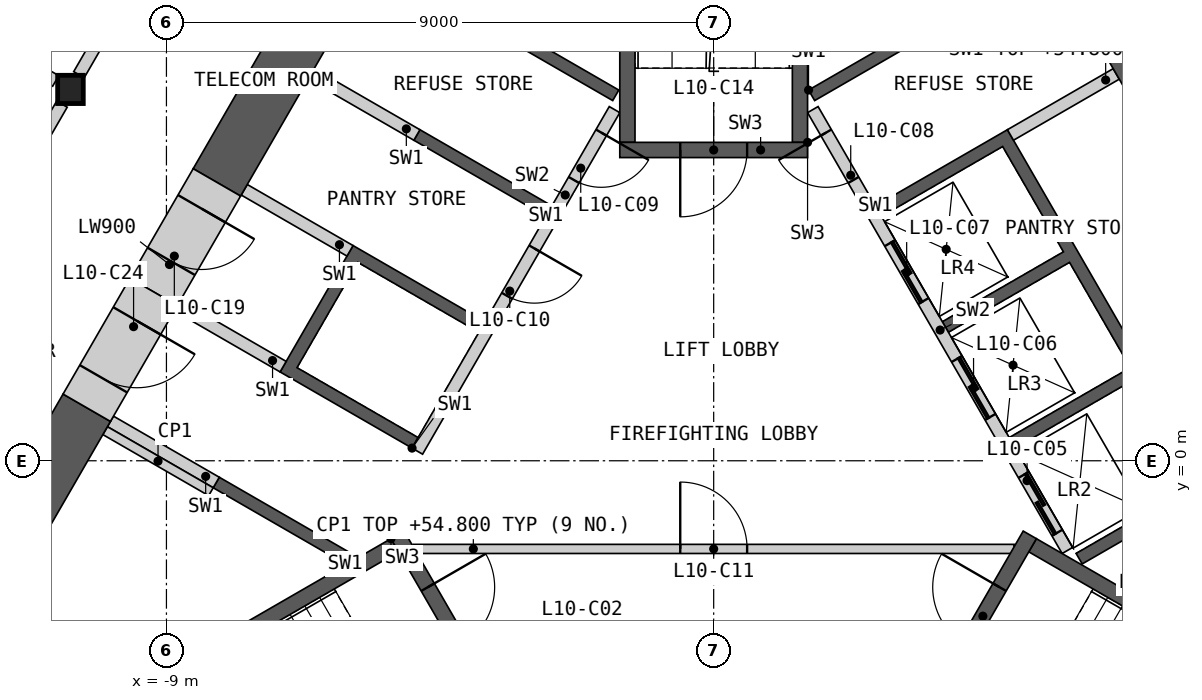
"""IFC4 building model, lengths in metres.
Left out: names, types, materials, properties, quantities, classifications, styles, units other than length and angle.
Written with IfcOpenShell. Run it as: python <this file> out.ifc"""

import sys

from ifc_helpers import new_model, si_unit, direction, frame, frame_2d, origin, origin_2d, place, context, subcontext, project, spatial, polyline, rectangle, i_section, outline, extrude, element, fill, save


model = new_model("IFC4")
c1 = context("Model", 3, precision=1e-05, world=origin(), true_north=direction((0.0, 1.0)))
c2 = subcontext(c1, "Body", "Model", "MODEL_VIEW")
j1 = project(units=[si_unit("LENGTHUNIT", "METRE"), si_unit("PLANEANGLEUNIT", "RADIAN")], contexts=[c1])
p1 = place(None, origin())
s1 = spatial("IfcSite", under=j1, at=p1, CompositionType="ELEMENT")
p2 = place(p1, origin())
s2 = spatial("IfcBuilding", under=s1, at=p2, CompositionType="ELEMENT")
p3 = place(p2, frame((0.0, 0.0, 51.0)))
s3 = spatial("IfcBuildingStorey", under=s2, at=p3, CompositionType="ELEMENT", Elevation=51.0)
p4 = place(p3, frame((-10.578, 6.107, 0.0), z_axis=(0.0, 0.0, 1.0), x_axis=(1.0, 0.0, 0.0)))
e1 = element("IfcColumn", 1, at=p4, inside=s3, PredefinedType="COLUMN", context=c2, shape_type="SweptSolid", body=[
    extrude(i_section(OverallWidth=0.421, OverallDepth=0.465, WebThickness=0.045, FlangeThickness=0.072, at=origin_2d()), origin(), (0.0, 0.0, 1.0), 4.2),
])
p5 = place(p3, origin())
e2 = element("IfcWall", 2, at=p5, inside=s3, PredefinedType="SHEAR", context=c2, shape_type="SweptSolid", body=[
    extrude(outline(polyline([(1.561, 6.097), (3.731, 7.35), (3.831, 7.177), (1.66, 5.924), (1.561, 6.097)])), origin(), (0.0, 0.0, 1.0), 3.8),
])
p6 = place(p3, origin())
e3 = element("IfcWall", 3, at=p6, inside=s3, PredefinedType="SHEAR", context=c2, shape_type="SweptSolid", body=[
    extrude(outline(polyline([(2.66, 4.192), (4.831, 5.445), (8.231, -0.444), (6.061, -1.697), (5.96, -1.524), (7.952, -0.374), (6.952, 1.358), (4.96, 0.208), (4.861, 0.381), (6.852, 1.531), (5.852, 3.263), (3.861, 2.113), (3.76, 2.287), (5.752, 3.437), (4.752, 5.169), (2.76, 4.019), (2.66, 4.192)])), origin(), (0.0, 0.0, 1.0), 3.8),
])
p7 = place(p3, frame((5.817, -1.476, 0.0), z_axis=(0.0, 0.0, 1.0), x_axis=(-0.500002616675, 0.866023893041, 0.0)))
e4 = element("IfcWall", 4, at=p7, inside=s3, PredefinedType="SOLIDWALL", context=c2, shape_type="SweptSolid", body=[
    extrude(rectangle(XDim=8.373, YDim=0.2, at=frame_2d((4.187, 0.0))), origin(), (0.0, 0.0, 1.0), 3.8),
])
p8 = place(p7, frame((0.337, 0.0, 0.0)))
e5 = element("IfcOpeningElement", 5, at=p8, cuts=e4, PredefinedType="OPENING", context=c2, shape_type="SweptSolid", body=[
    extrude(rectangle(XDim=1.1, YDim=2.1, at=frame_2d((0.55, 1.05))), frame((0.0, 0.11, 0.0), z_axis=(0.0, -1.0, 0.0), x_axis=(1.0, 0.0, 0.0)), (0.0, 0.0, 1.0), 0.22),
])
p9 = place(p7, frame((2.537, 0.0, 0.0)))
e6 = element("IfcOpeningElement", 6, at=p9, cuts=e4, PredefinedType="OPENING", context=c2, shape_type="SweptSolid", body=[
    extrude(rectangle(XDim=1.1, YDim=2.1, at=frame_2d((0.55, 1.05))), frame((0.0, 0.11, 0.0), z_axis=(0.0, -1.0, 0.0), x_axis=(1.0, 0.0, 0.0)), (0.0, 0.0, 1.0), 0.22),
])
p10 = place(p7, frame((4.737, 0.0, 0.0)))
e7 = element("IfcOpeningElement", 7, at=p10, cuts=e4, PredefinedType="OPENING", context=c2, shape_type="SweptSolid", body=[
    extrude(rectangle(XDim=1.1, YDim=2.1, at=frame_2d((0.55, 1.05))), frame((0.0, 0.11, 0.0), z_axis=(0.0, -1.0, 0.0), x_axis=(1.0, 0.0, 0.0)), (0.0, 0.0, 1.0), 0.22),
])
p11 = place(p7, frame((7.037, 0.0, 0.0)))
e8 = element("IfcOpeningElement", 8, at=p11, cuts=e4, PredefinedType="OPENING", context=c2, shape_type="SweptSolid", body=[
    extrude(rectangle(XDim=0.9, YDim=2.1, at=frame_2d((0.45, 1.05))), frame((0.0, 0.11, 0.0), z_axis=(0.0, -1.0, 0.0), x_axis=(1.0, 0.0, 0.0)), (0.0, 0.0, 1.0), 0.22),
])
p12 = place(p3, frame((4.881, 5.358, 0.0), z_axis=(0.0, 0.0, 1.0), x_axis=(0.866035824272, 0.499981950752, 0.0)))
e9 = element("IfcWall", 9, at=p12, inside=s3, PredefinedType="SHEAR", context=c2, shape_type="SweptSolid", body=[
    extrude(rectangle(XDim=2.009, YDim=0.2, at=frame_2d((1.004, 0.0))), origin(), (0.0, 0.0, 1.0), 3.8),
])
p13 = place(p3, origin())
e10 = element("IfcWall", 10, at=p13, inside=s3, PredefinedType="SHEAR", context=c2, shape_type="SweptSolid", body=[
    extrude(outline(polyline([(-6.061, -1.697), (-8.231, -0.444), (-8.131, -0.271), (-5.96, -1.524), (-6.061, -1.697)])), origin(), (0.0, 0.0, 1.0), 3.8),
])
p14 = place(p3, origin())
e11 = element("IfcWall", 11, at=p14, inside=s3, PredefinedType="SHEAR", context=c2, shape_type="SweptSolid", body=[
    extrude(outline(polyline([(-4.96, 0.208), (-7.131, 1.461), (-5.931, 3.54), (-3.76, 2.287), (-3.861, 2.113), (-5.852, 3.263), (-6.852, 1.531), (-4.861, 0.381), (-4.96, 0.208)])), origin(), (0.0, 0.0, 1.0), 3.8),
])
p15 = place(p3, origin())
e12 = element("IfcWall", 12, at=p15, inside=s3, PredefinedType="SHEAR", context=c2, shape_type="SweptSolid", body=[
    extrude(outline(polyline([(-2.76, 4.019), (-4.931, 5.272), (-4.831, 5.445), (-2.66, 4.192), (-2.76, 4.019)])), origin(), (0.0, 0.0, 1.0), 3.8),
])
p16 = place(p3, origin())
e13 = element("IfcWall", 13, at=p16, inside=s3, PredefinedType="SHEAR", context=c2, shape_type="SweptSolid", body=[
    extrude(outline(polyline([(-3.731, 7.35), (-1.561, 6.097), (-1.66, 5.924), (-3.831, 7.177), (-3.731, 7.35)])), origin(), (0.0, 0.0, 1.0), 3.8),
])
p17 = place(p3, frame((-1.631, 5.776, 0.0), z_axis=(0.0, 0.0, 1.0), x_axis=(-0.499992876559, -0.866029516466, 0.0)))
e14 = element("IfcWall", 14, at=p17, inside=s3, PredefinedType="SOLIDWALL", context=c2, shape_type="SweptSolid", body=[
    extrude(rectangle(XDim=6.486, YDim=0.2, at=frame_2d((3.243, 0.0))), origin(), (0.0, 0.0, 1.0), 3.8),
])
p18 = place(p17, frame((0.437, 0.0, 0.0)))
e15 = element("IfcOpeningElement", 15, at=p18, cuts=e14, PredefinedType="OPENING", context=c2, shape_type="SweptSolid", body=[
    extrude(rectangle(XDim=0.9, YDim=2.1, at=frame_2d((0.45, 1.05))), frame((0.0, 0.11, 0.0), z_axis=(0.0, -1.0, 0.0), x_axis=(1.0, 0.0, 0.0)), (0.0, 0.0, 1.0), 0.22),
])
p19 = place(p17, frame((2.637, 0.0, 0.0)))
e16 = element("IfcOpeningElement", 16, at=p19, cuts=e14, PredefinedType="OPENING", context=c2, shape_type="SweptSolid", body=[
    extrude(rectangle(XDim=0.9, YDim=2.1, at=frame_2d((0.45, 1.05))), frame((0.0, 0.11, 0.0), z_axis=(0.0, -1.0, 0.0), x_axis=(1.0, 0.0, 0.0)), (0.0, 0.0, 1.0), 0.22),
])
p20 = place(p3, frame((-4.881, 5.358, 0.0), z_axis=(0.0, 0.0, 1.0), x_axis=(-0.866035824272, 0.499981950752, 0.0)))
e17 = element("IfcWall", 17, at=p20, inside=s3, PredefinedType="SHEAR", context=c2, shape_type="SweptSolid", body=[
    extrude(rectangle(XDim=2.009, YDim=0.2, at=frame_2d((1.004, 0.0))), origin(), (0.0, 0.0, 1.0), 3.8),
])
p21 = place(p3, frame((-5.981, 3.453, 0.0), z_axis=(0.0, 0.0, 1.0), x_axis=(-0.866013584312, 0.500020471368, 0.0)))
e18 = element("IfcWall", 18, at=p21, inside=s3, PredefinedType="SHEAR", context=c2, shape_type="SweptSolid", body=[
    extrude(rectangle(XDim=2.009, YDim=0.2, at=frame_2d((1.005, 0.0))), origin(), (0.0, 0.0, 1.0), 3.8),
])
p22 = place(p3, frame((-7.081, 1.548, 0.0), z_axis=(0.0, 0.0, 1.0), x_axis=(-0.865983199114, 0.50007309351, 0.0)))
e19 = element("IfcWall", 19, at=p22, inside=s3, PredefinedType="SHEAR", context=c2, shape_type="SweptSolid", body=[
    extrude(rectangle(XDim=2.009, YDim=0.2, at=frame_2d((1.004, 0.0))), origin(), (0.0, 0.0, 1.0), 3.8),
])
p23 = place(p3, frame((-8.181, -0.357, 0.0), z_axis=(0.0, 0.0, 1.0), x_axis=(-0.866035824272, 0.499981950752, 0.0)))
e20 = element("IfcWall", 20, at=p23, inside=s3, PredefinedType="SHEAR", context=c2, shape_type="SweptSolid", body=[
    extrude(rectangle(XDim=2.009, YDim=0.2, at=frame_2d((1.004, 0.0))), origin(), (0.0, 0.0, 1.0), 3.8),
])
p24 = place(p3, frame((-4.941, -1.45, 0.0), z_axis=(0.0, 0.0, 1.0), x_axis=(1.0, 0.0, 0.0)))
e21 = element("IfcWall", 21, at=p24, inside=s3, PredefinedType="PARTITIONING", context=c2, shape_type="SweptSolid", body=[
    extrude(rectangle(XDim=9.882, YDim=0.15, at=frame_2d((4.941, 0.0))), origin(), (0.0, 0.0, 1.0), 3.8),
])
p25 = place(p24, frame((4.391, 0.0, 0.0)))
e22 = element("IfcOpeningElement", 22, at=p25, cuts=e21, PredefinedType="OPENING", context=c2, shape_type="SweptSolid", body=[
    extrude(rectangle(XDim=1.1, YDim=2.1, at=frame_2d((0.55, 1.05))), frame((0.0, 0.085, 0.0), z_axis=(0.0, -1.0, 0.0), x_axis=(1.0, 0.0, 0.0)), (0.0, 0.0, 1.0), 0.17),
])
p26 = place(p3, origin())
e23 = element("IfcWall", 23, at=p26, inside=s3, PredefinedType="SHEAR", context=c2, shape_type="SweptSolid", body=[
    extrude(outline(polyline([(-5.307, -1.281), (-10.374, -4.206), (-10.032, -4.298), (-5.182, -1.498), (-5.307, -1.281)])), origin(), (0.0, 0.0, 1.0), 3.8),
])
p27 = place(p3, frame((-5.199, -1.219, 0.0), z_axis=(0.0, 0.0, 1.0), x_axis=(0.499982516597, -0.866035497597, 0.0)))
e24 = element("IfcWall", 24, at=p27, inside=s3, PredefinedType="SHEAR", context=c2, shape_type="SweptSolid", body=[
    extrude(rectangle(XDim=3.088, YDim=0.25, at=frame_2d((1.544, 0.0))), origin(), (0.0, 0.0, 1.0), 3.8),
])
p28 = place(p27, frame((0.994, 0.0, 0.0)))
e25 = element("IfcOpeningElement", 25, at=p28, cuts=e24, PredefinedType="OPENING", context=c2, shape_type="SweptSolid", body=[
    extrude(rectangle(XDim=1.1, YDim=2.1, at=frame_2d((0.55, 1.05))), frame((0.0, 0.135, 0.0), z_axis=(0.0, -1.0, 0.0), x_axis=(1.0, 0.0, 0.0)), (0.0, 0.0, 1.0), 0.27),
])
p29 = place(p3, origin())
e26 = element("IfcWall", 26, at=p29, inside=s3, PredefinedType="SHEAR", context=c2, shape_type="SweptSolid", body=[
    extrude(outline(polyline([(10.032, -4.298), (10.374, -4.206), (5.307, -1.281), (5.182, -1.498), (10.032, -4.298)])), origin(), (0.0, 0.0, 1.0), 3.8),
])
p30 = place(p3, frame((3.655, -3.893, 0.0), z_axis=(0.0, 0.0, 1.0), x_axis=(0.499982516597, 0.866035497597, 0.0)))
e27 = element("IfcWall", 27, at=p30, inside=s3, PredefinedType="SHEAR", context=c2, shape_type="SweptSolid", body=[
    extrude(rectangle(XDim=3.088, YDim=0.25, at=frame_2d((1.544, 0.0))), origin(), (0.0, 0.0, 1.0), 3.8),
])
p31 = place(p30, frame((0.994, 0.0, 0.0)))
e28 = element("IfcOpeningElement", 28, at=p31, cuts=e27, PredefinedType="OPENING", context=c2, shape_type="SweptSolid", body=[
    extrude(rectangle(XDim=1.1, YDim=2.1, at=frame_2d((0.55, 1.05))), frame((0.0, 0.135, 0.0), z_axis=(0.0, -1.0, 0.0), x_axis=(1.0, 0.0, 0.0)), (0.0, 0.0, 1.0), 0.27),
])
p32 = place(p3, origin())
e29 = element("IfcWall", 29, at=p32, inside=s3, PredefinedType="SHEAR", context=c2, shape_type="SweptSolid", body=[
    extrude(outline(polyline([(1.544, 5.237), (1.544, 11.087), (1.294, 10.837), (1.294, 5.237), (1.544, 5.237)])), origin(), (0.0, 0.0, 1.0), 3.8),
])
p33 = place(p3, origin())
e30 = element("IfcWall", 30, at=p33, inside=s3, PredefinedType="SHEAR", context=c2, shape_type="SweptSolid", body=[
    extrude(outline(polyline([(-1.294, 10.837), (-1.544, 11.087), (-1.544, 5.237), (-1.294, 5.237), (-1.294, 10.837)])), origin(), (0.0, 0.0, 1.0), 3.8),
])
p34 = place(p3, frame((1.544, 5.112, 0.0), z_axis=(0.0, 0.0, 1.0), x_axis=(-1.0, 0.0, 0.0)))
e31 = element("IfcWall", 31, at=p34, inside=s3, PredefinedType="SHEAR", context=c2, shape_type="SweptSolid", body=[
    extrude(rectangle(XDim=3.088, YDim=0.25, at=frame_2d((1.544, 0.0))), origin(), (0.0, 0.0, 1.0), 3.8),
])
p35 = place(p34, frame((0.994, 0.0, 0.0)))
e32 = element("IfcOpeningElement", 32, at=p35, cuts=e31, PredefinedType="OPENING", context=c2, shape_type="SweptSolid", body=[
    extrude(rectangle(XDim=1.1, YDim=2.1, at=frame_2d((0.55, 1.05))), frame((0.0, 0.135, 0.0), z_axis=(0.0, -1.0, 0.0), x_axis=(1.0, 0.0, 0.0)), (0.0, 0.0, 1.0), 0.27),
])
p36 = place(p3, frame((-8.268, -0.509, 0.0), z_axis=(0.0, 0.0, 1.0), x_axis=(-0.866035824272, 0.499981950752, 0.0)))
e33 = element("IfcWall", 33, at=p36, inside=s3, PredefinedType="PARTITIONING", context=c2, shape_type="SweptSolid", body=[
    extrude(rectangle(XDim=2.009, YDim=0.15, at=frame_2d((1.004, 0.0))), origin(), (0.0, 0.0, 1.0), 3.8),
])
p37 = place(p3, frame((7.646, 5.486, 0.0), z_axis=(0.0, 0.0, 1.0), x_axis=(-0.499978218965, 0.866037978706, 0.0)))
e34 = element("IfcWall", 34, at=p37, inside=s3, PredefinedType="SHEAR", context=c2, shape_type="SweptSolid", body=[
    extrude(rectangle(XDim=4.076, YDim=0.9, at=frame_2d((2.038, 0.0))), origin(), (0.0, 0.0, 1.0), 3.8),
])
p38 = place(p3, frame((-10.31, 0.872, 0.0), z_axis=(0.0, 0.0, 1.0), x_axis=(-0.499991697393, -0.866030197244, 0.0)))
e35 = element("IfcWall", 35, at=p38, inside=s3, PredefinedType="SHEAR", context=c2, shape_type="SweptSolid", body=[
    extrude(rectangle(XDim=11.041, YDim=0.9, at=frame_2d((5.521, 0.0))), origin(), (0.0, 0.0, 1.0), 3.8),
])
p39 = place(p3, frame((-4.466, 10.995, 0.0), z_axis=(0.0, 0.0, 1.0), x_axis=(-0.500012427149, -0.866018228848, 0.0)))
e36 = element("IfcWall", 36, at=p39, inside=s3, PredefinedType="SHEAR", context=c2, shape_type="SweptSolid", body=[
    extrude(rectangle(XDim=7.409, YDim=0.9, at=frame_2d((3.705, 0.0))), origin(), (0.0, 0.0, 1.0), 3.8),
])
p40 = place(p3, frame((-8.17, 4.579, 0.0), z_axis=(0.0, 0.0, 1.0), x_axis=(-0.499888406853, -0.866089822532, 0.0)))
e37 = element("IfcWall", 37, at=p40, inside=s3, PredefinedType="SHEAR", context=c2, shape_type="SweptSolid", body=[
    extrude(rectangle(XDim=2.08, YDim=0.9, at=frame_2d((1.04, 0.0))), origin(), (0.0, 0.0, 1.0), 3.8),
])
p41 = place(p40, frame((0.5, 0.0, 0.0)))
e38 = element("IfcOpeningElement", 38, at=p41, cuts=e37, PredefinedType="OPENING", context=c2, shape_type="SweptSolid", body=[
    extrude(rectangle(XDim=1.0, YDim=2.1, at=frame_2d((0.5, 1.05))), frame((0.0, 0.46, 0.0), z_axis=(0.0, -1.0, 0.0), x_axis=(1.0, 0.0, 0.0)), (0.0, 0.0, 1.0), 0.92),
])
p42 = place(p3, frame((-9.21, 2.777, 0.0), z_axis=(0.0, 0.0, 1.0), x_axis=(-0.500077893725, -0.86598042715, 0.0)))
e39 = element("IfcWall", 39, at=p42, inside=s3, PredefinedType="SHEAR", context=c2, shape_type="SweptSolid", body=[
    extrude(rectangle(XDim=2.2, YDim=0.9, at=frame_2d((1.1, 0.0))), origin(), (0.0, 0.0, 1.0), 3.8),
])
p43 = place(p42, frame((0.55, 0.0, 0.0)))
e40 = element("IfcOpeningElement", 40, at=p43, cuts=e39, PredefinedType="OPENING", context=c2, shape_type="SweptSolid", body=[
    extrude(rectangle(XDim=1.1, YDim=2.1, at=frame_2d((0.55, 1.05))), frame((0.0, 0.46, 0.0), z_axis=(0.0, -1.0, 0.0), x_axis=(1.0, 0.0, 0.0)), (0.0, 0.0, 1.0), 0.92),
])
p44 = place(p3, frame((-10.439, 6.35, 0.0), z_axis=(0.0, 0.0, 1.0), x_axis=(0.50001002959, 0.86601961312, 0.0)))
e41 = element("IfcWall", 41, at=p44, inside=s3, PredefinedType="PARTITIONING", context=c2, shape_type="SweptSolid", body=[
    extrude(rectangle(XDim=10.019, YDim=0.2, at=frame_2d((5.009, 0.0))), origin(), (0.0, 0.0, 1.0), 3.8),
])
p45 = place(p44, frame((4.159, 0.0, 0.0)))
e42 = element("IfcOpeningElement", 42, at=p45, cuts=e41, PredefinedType="OPENING", context=c2, shape_type="SweptSolid", body=[
    extrude(rectangle(XDim=1.0, YDim=2.1, at=frame_2d((0.5, 1.05))), frame((0.0, 0.11, 0.0), z_axis=(0.0, -1.0, 0.0), x_axis=(1.0, 0.0, 0.0)), (0.0, 0.0, 1.0), 0.22),
])
p46 = place(p3, frame((5.429, 15.026, 0.0), z_axis=(0.0, 0.0, 1.0), x_axis=(0.50001002959, -0.86601961312, 0.0)))
e43 = element("IfcWall", 43, at=p46, inside=s3, PredefinedType="PARTITIONING", context=c2, shape_type="SweptSolid", body=[
    extrude(rectangle(XDim=10.019, YDim=0.2, at=frame_2d((5.009, 0.0))), origin(), (0.0, 0.0, 1.0), 3.8),
])
p47 = place(p46, frame((4.86, 0.0, 0.0)))
e44 = element("IfcOpeningElement", 44, at=p47, cuts=e43, PredefinedType="OPENING", context=c2, shape_type="SweptSolid", body=[
    extrude(rectangle(XDim=1.0, YDim=2.1, at=frame_2d((0.5, 1.05))), frame((0.0, 0.11, 0.0), z_axis=(0.0, -1.0, 0.0), x_axis=(1.0, 0.0, 0.0)), (0.0, 0.0, 1.0), 0.22),
])
p48 = place(p3, frame((-15.728, -2.811, 0.0), z_axis=(0.0, 0.0, 1.0), x_axis=(0.49999175339, 0.866030164915, 0.0)))
e45 = element("IfcWall", 45, at=p48, inside=s3, PredefinedType="PARTITIONING", context=c2, shape_type="SweptSolid", body=[
    extrude(rectangle(XDim=10.019, YDim=0.2, at=frame_2d((5.009, 0.0))), origin(), (0.0, 0.0, 1.0), 3.8),
])
p49 = place(p48, frame((4.059, 0.0, 0.0)))
e46 = element("IfcOpeningElement", 46, at=p49, cuts=e45, PredefinedType="OPENING", context=c2, shape_type="SweptSolid", body=[
    extrude(rectangle(XDim=1.8, YDim=2.1, at=frame_2d((0.9, 1.05))), frame((0.0, 0.11, 0.0), z_axis=(0.0, -1.0, 0.0), x_axis=(1.0, 0.0, 0.0)), (0.0, 0.0, 1.0), 0.22),
])
p50 = place(p3, frame((-21.947, 12.671, 0.0), z_axis=(0.0, 0.0, 1.0), x_axis=(0.866026729935, -0.499997703033, 0.0)))
e47 = element("IfcWall", 47, at=p50, inside=s3, PredefinedType="PARTITIONING", context=c2, shape_type="SweptSolid", body=[
    extrude(rectangle(XDim=12.848, YDim=0.2, at=frame_2d((6.424, 0.0))), origin(), (0.0, 0.0, 1.0), 2.885),
])
p51 = place(p8, origin())
e48 = element("IfcDoor", 48, at=p51, inside=s3, OperationType="SLIDING_TO_LEFT", PredefinedType="DOOR", context=c2, shape_type="SweptSolid", body=[
    extrude(rectangle(XDim=1.1, YDim=2.1, at=frame_2d((0.55, 1.05))), frame((0.0, 0.025, 0.0), z_axis=(0.0, -1.0, 0.0), x_axis=(1.0, 0.0, 0.0)), (0.0, 0.0, 1.0), 0.05),
])
fill(e5, e48)
p52 = place(p9, origin())
e49 = element("IfcDoor", 49, at=p52, inside=s3, OperationType="SLIDING_TO_LEFT", PredefinedType="DOOR", context=c2, shape_type="SweptSolid", body=[
    extrude(rectangle(XDim=1.1, YDim=2.1, at=frame_2d((0.55, 1.05))), frame((0.0, 0.025, 0.0), z_axis=(0.0, -1.0, 0.0), x_axis=(1.0, 0.0, 0.0)), (0.0, 0.0, 1.0), 0.05),
])
fill(e6, e49)
p53 = place(p10, origin())
e50 = element("IfcDoor", 50, at=p53, inside=s3, OperationType="SLIDING_TO_LEFT", PredefinedType="DOOR", context=c2, shape_type="SweptSolid", body=[
    extrude(rectangle(XDim=1.1, YDim=2.1, at=frame_2d((0.55, 1.05))), frame((0.0, 0.025, 0.0), z_axis=(0.0, -1.0, 0.0), x_axis=(1.0, 0.0, 0.0)), (0.0, 0.0, 1.0), 0.05),
])
fill(e7, e50)
p54 = place(p11, origin())
e51 = element("IfcDoor", 51, at=p54, inside=s3, OperationType="SINGLE_SWING_RIGHT", PredefinedType="DOOR", context=c2, shape_type="SweptSolid", body=[
    extrude(rectangle(XDim=0.9, YDim=2.1, at=frame_2d((0.45, 1.05))), frame((0.0, 0.025, 0.0), z_axis=(0.0, -1.0, 0.0), x_axis=(1.0, 0.0, 0.0)), (0.0, 0.0, 1.0), 0.05),
])
fill(e8, e51)
p55 = place(p18, origin())
e52 = element("IfcDoor", 52, at=p55, inside=s3, OperationType="SINGLE_SWING_LEFT", PredefinedType="DOOR", context=c2, shape_type="SweptSolid", body=[
    extrude(rectangle(XDim=0.9, YDim=2.1, at=frame_2d((0.45, 1.05))), frame((0.0, 0.025, 0.0), z_axis=(0.0, -1.0, 0.0), x_axis=(1.0, 0.0, 0.0)), (0.0, 0.0, 1.0), 0.05),
])
fill(e15, e52)
p56 = place(p19, origin())
e53 = element("IfcDoor", 53, at=p56, inside=s3, OperationType="SINGLE_SWING_LEFT", PredefinedType="DOOR", context=c2, shape_type="SweptSolid", body=[
    extrude(rectangle(XDim=0.9, YDim=2.1, at=frame_2d((0.45, 1.05))), frame((0.0, 0.025, 0.0), z_axis=(0.0, -1.0, 0.0), x_axis=(1.0, 0.0, 0.0)), (0.0, 0.0, 1.0), 0.05),
])
fill(e16, e53)
p57 = place(p25, origin())
e54 = element("IfcDoor", 54, at=p57, inside=s3, OperationType="SINGLE_SWING_LEFT", PredefinedType="DOOR", context=c2, shape_type="SweptSolid", body=[
    extrude(rectangle(XDim=1.1, YDim=2.1, at=frame_2d((0.55, 1.05))), frame((0.0, 0.025, 0.0), z_axis=(0.0, -1.0, 0.0), x_axis=(1.0, 0.0, 0.0)), (0.0, 0.0, 1.0), 0.05),
])
fill(e22, e54)
p58 = place(p28, origin())
e55 = element("IfcDoor", 55, at=p58, inside=s3, OperationType="SINGLE_SWING_LEFT", PredefinedType="DOOR", context=c2, shape_type="SweptSolid", body=[
    extrude(rectangle(XDim=1.1, YDim=2.1, at=frame_2d((0.55, 1.05))), frame((0.0, 0.025, 0.0), z_axis=(0.0, -1.0, 0.0), x_axis=(1.0, 0.0, 0.0)), (0.0, 0.0, 1.0), 0.05),
])
fill(e25, e55)
p59 = place(p31, origin())
e56 = element("IfcDoor", 56, at=p59, inside=s3, OperationType="SINGLE_SWING_RIGHT", PredefinedType="DOOR", context=c2, shape_type="SweptSolid", body=[
    extrude(rectangle(XDim=1.1, YDim=2.1, at=frame_2d((0.55, 1.05))), frame((0.0, 0.025, 0.0), z_axis=(0.0, -1.0, 0.0), x_axis=(1.0, 0.0, 0.0)), (0.0, 0.0, 1.0), 0.05),
])
fill(e28, e56)
p60 = place(p35, origin())
e57 = element("IfcDoor", 57, at=p60, inside=s3, OperationType="SINGLE_SWING_RIGHT", PredefinedType="DOOR", context=c2, shape_type="SweptSolid", body=[
    extrude(rectangle(XDim=1.1, YDim=2.1, at=frame_2d((0.55, 1.05))), frame((0.0, 0.025, 0.0), z_axis=(0.0, -1.0, 0.0), x_axis=(1.0, 0.0, 0.0)), (0.0, 0.0, 1.0), 0.05),
])
fill(e32, e57)
p61 = place(p41, origin())
e58 = element("IfcDoor", 58, at=p61, inside=s3, OperationType="SINGLE_SWING_LEFT", PredefinedType="DOOR", context=c2, shape_type="SweptSolid", body=[
    extrude(rectangle(XDim=1.0, YDim=2.1, at=frame_2d((0.5, 1.05))), frame((0.0, 0.205, 0.0), z_axis=(0.0, -1.0, 0.0), x_axis=(1.0, 0.0, 0.0)), (0.0, 0.0, 1.0), 0.05),
])
fill(e38, e58)
p62 = place(p43, origin())
e59 = element("IfcDoor", 59, at=p62, inside=s3, OperationType="SINGLE_SWING_LEFT", PredefinedType="DOOR", context=c2, shape_type="SweptSolid", body=[
    extrude(rectangle(XDim=1.1, YDim=2.1, at=frame_2d((0.55, 1.05))), frame((0.0, 0.205, 0.0), z_axis=(0.0, -1.0, 0.0), x_axis=(1.0, 0.0, 0.0)), (0.0, 0.0, 1.0), 0.05),
])
fill(e40, e59)
save(model, sys.argv[1])
